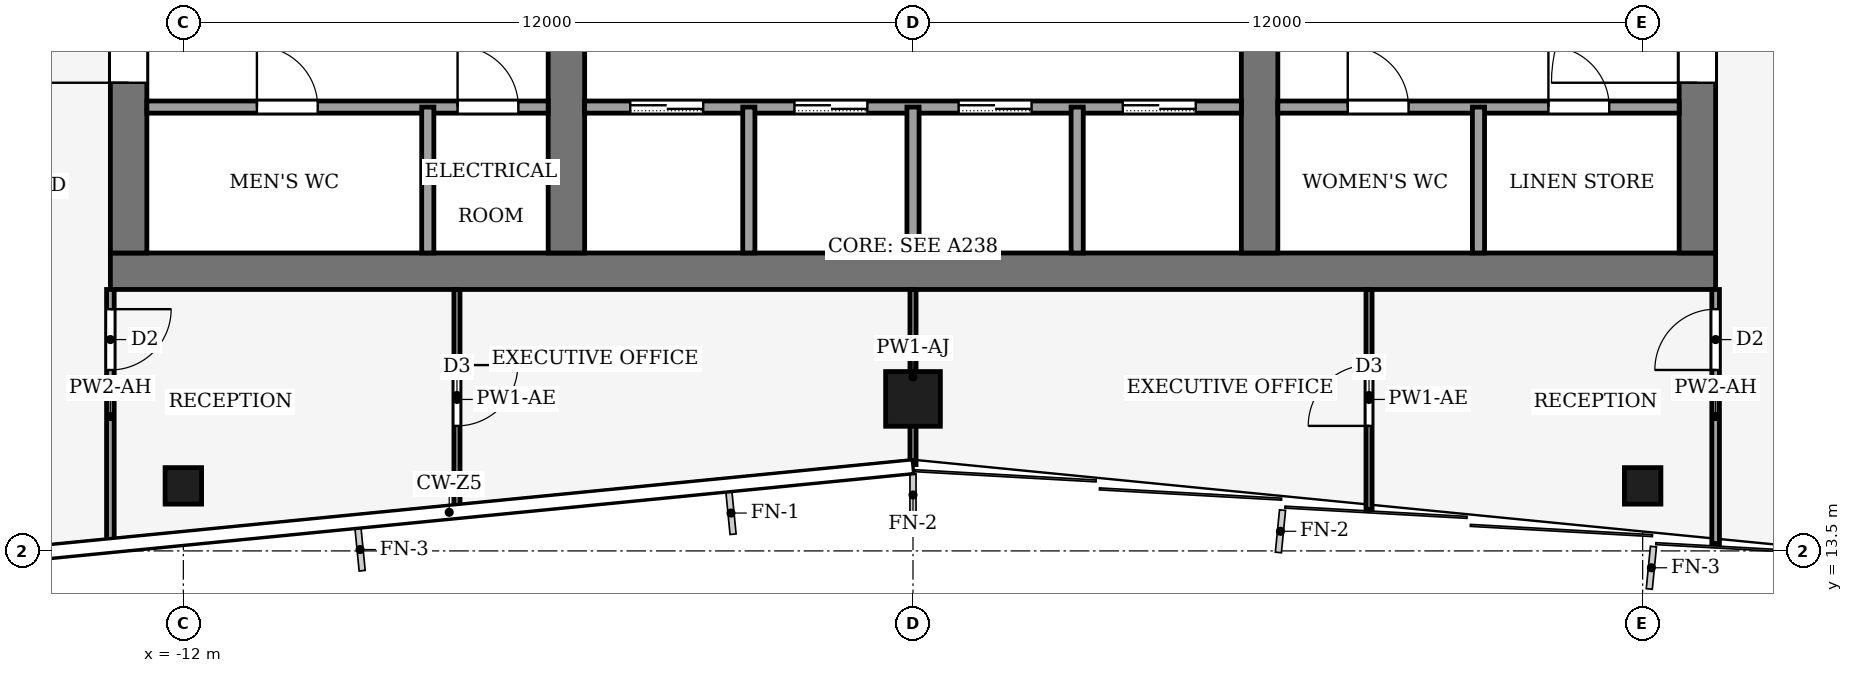
"""IFC4 building model, lengths in metres.
Left out: names, types, materials, properties, quantities, classifications, styles, units other than length and angle.
Written with IfcOpenShell. Run it as: python <this file> out.ifc"""

import sys

from ifc_helpers import new_model, si_unit, direction, frame, frame_2d, origin, origin_2d, place, context, subcontext, project, spatial, rectangle, hollow_rectangle, extrude, element, fill, save


model = new_model("IFC4")
c1 = context("Model", 3, precision=1e-05, world=origin(), true_north=direction((0.0, 1.0)))
c2 = subcontext(c1, "Body", "Model", "MODEL_VIEW")
j1 = project(units=[si_unit("LENGTHUNIT", "METRE"), si_unit("PLANEANGLEUNIT", "RADIAN")], contexts=[c1])
p1 = place(None, origin())
s1 = spatial("IfcSite", under=j1, at=p1, CompositionType="ELEMENT")
p2 = place(p1, origin())
s2 = spatial("IfcBuilding", under=s1, at=p2, CompositionType="ELEMENT")
p3 = place(p2, frame((0.0, 0.0, 330.0)))
s3 = spatial("IfcBuildingStorey", under=s2, at=p3, CompositionType="ELEMENT", Elevation=330.0)
p4 = place(p3, frame((-13.2, 18.1, -0.13), z_axis=(0.0, 0.0, 1.0), x_axis=(1.0, 0.0, 0.0)))
e1 = element("IfcWall", 1, at=p4, inside=s3, PredefinedType="SHEAR", context=c2, shape_type="SweptSolid", body=[
    extrude(rectangle(XDim=26.4, YDim=0.6, at=frame_2d((13.2, 0.0))), origin(), (0.0, 0.0, 1.0), 3.95),
])
p5 = place(p3, frame((-12.9, 18.4, -0.13), z_axis=(0.0, 0.0, 1.0), x_axis=(0.0, 1.0, 0.0)))
e2 = element("IfcWall", 2, at=p5, inside=s3, PredefinedType="SHEAR", context=c2, shape_type="SweptSolid", body=[
    extrude(rectangle(XDim=19.2, YDim=0.6, at=frame_2d((9.6, 0.0))), origin(), (0.0, 0.0, 1.0), 3.95),
])
p6 = place(p5, frame((2.8, 0.0, 0.13)))
e3 = element("IfcOpeningElement", 3, at=p6, cuts=e2, PredefinedType="OPENING", context=c2, shape_type="SweptSolid", body=[
    extrude(rectangle(XDim=2.4, YDim=2.4, at=frame_2d((1.2, 1.2))), frame((0.0, 0.31, 0.0), z_axis=(0.0, -1.0, 0.0), x_axis=(1.0, 0.0, 0.0)), (0.0, 0.0, 1.0), 0.62),
])
p7 = place(p5, frame((13.4, 0.0, 0.13)))
e4 = element("IfcOpeningElement", 4, at=p7, cuts=e2, PredefinedType="OPENING", context=c2, shape_type="SweptSolid", body=[
    extrude(rectangle(XDim=1.4, YDim=2.2, at=frame_2d((0.7, 1.1))), frame((0.0, 0.31, 0.0), z_axis=(0.0, -1.0, 0.0), x_axis=(1.0, 0.0, 0.0)), (0.0, 0.0, 1.0), 0.62),
])
p8 = place(p3, frame((12.9, 18.4, -0.13), z_axis=(0.0, 0.0, 1.0), x_axis=(0.0, 1.0, 0.0)))
e5 = element("IfcWall", 5, at=p8, inside=s3, PredefinedType="SHEAR", context=c2, shape_type="SweptSolid", body=[
    extrude(rectangle(XDim=19.2, YDim=0.6, at=frame_2d((9.6, 0.0))), origin(), (0.0, 0.0, 1.0), 3.95),
])
p9 = place(p8, frame((2.8, 0.0, 0.13)))
e6 = element("IfcOpeningElement", 6, at=p9, cuts=e5, PredefinedType="OPENING", context=c2, shape_type="SweptSolid", body=[
    extrude(rectangle(XDim=2.4, YDim=2.4, at=frame_2d((1.2, 1.2))), frame((0.0, 0.31, 0.0), z_axis=(0.0, -1.0, 0.0), x_axis=(1.0, 0.0, 0.0)), (0.0, 0.0, 1.0), 0.62),
])
p10 = place(p8, frame((13.3, 0.0, 0.13)))
e7 = element("IfcOpeningElement", 7, at=p10, cuts=e5, PredefinedType="OPENING", context=c2, shape_type="SweptSolid", body=[
    extrude(rectangle(XDim=2.4, YDim=2.4, at=frame_2d((1.2, 1.2))), frame((0.0, 0.31, 0.0), z_axis=(0.0, -1.0, 0.0), x_axis=(1.0, 0.0, 0.0)), (0.0, 0.0, 1.0), 0.62),
])
p11 = place(p3, frame((-5.7, 18.4, -0.13), z_axis=(0.0, 0.0, 1.0), x_axis=(0.0, 1.0, 0.0)))
e8 = element("IfcWall", 8, at=p11, inside=s3, PredefinedType="SHEAR", context=c2, shape_type="SweptSolid", body=[
    extrude(rectangle(XDim=19.2, YDim=0.6, at=frame_2d((9.6, 0.0))), origin(), (0.0, 0.0, 1.0), 3.95),
])
p12 = place(p11, frame((8.35, 0.0, 0.13)))
e9 = element("IfcOpeningElement", 9, at=p12, cuts=e8, PredefinedType="OPENING", context=c2, shape_type="SweptSolid", body=[
    extrude(rectangle(XDim=0.9, YDim=2.1, at=frame_2d((0.45, 1.05))), frame((0.0, 0.31, 0.0), z_axis=(0.0, -1.0, 0.0), x_axis=(1.0, 0.0, 0.0)), (0.0, 0.0, 1.0), 0.62),
])
p13 = place(p3, frame((5.7, 18.4, -0.13), z_axis=(0.0, 0.0, 1.0), x_axis=(0.0, 1.0, 0.0)))
e10 = element("IfcWall", 10, at=p13, inside=s3, PredefinedType="SHEAR", context=c2, shape_type="SweptSolid", body=[
    extrude(rectangle(XDim=19.2, YDim=0.6, at=frame_2d((9.6, 0.0))), origin(), (0.0, 0.0, 1.0), 3.95),
])
p14 = place(p13, frame((8.35, 0.0, 0.13)))
e11 = element("IfcOpeningElement", 11, at=p14, cuts=e10, PredefinedType="OPENING", context=c2, shape_type="SweptSolid", body=[
    extrude(rectangle(XDim=0.9, YDim=2.1, at=frame_2d((0.45, 1.05))), frame((0.0, 0.31, 0.0), z_axis=(0.0, -1.0, 0.0), x_axis=(1.0, 0.0, 0.0)), (0.0, 0.0, 1.0), 0.62),
])
p15 = place(p13, frame((13.3, 0.0, 0.13)))
e12 = element("IfcOpeningElement", 12, at=p15, cuts=e10, PredefinedType="OPENING", context=c2, shape_type="SweptSolid", body=[
    extrude(rectangle(XDim=2.4, YDim=2.4, at=frame_2d((1.2, 1.2))), frame((0.0, 0.31, 0.0), z_axis=(0.0, -1.0, 0.0), x_axis=(1.0, 0.0, 0.0)), (0.0, 0.0, 1.0), 0.62),
])
p16 = place(p3, frame((0.0, 16.0, 0.0), z_axis=(0.0, 0.0, 1.0), x_axis=(1.0, 0.0, 0.0)))
e13 = element("IfcColumn", 13, at=p16, inside=s3, PredefinedType="COLUMN", context=c2, shape_type="SweptSolid", body=[
    extrude(hollow_rectangle(XDim=0.9, YDim=0.9, WallThickness=0.04, at=origin_2d()), origin(), (0.0, 0.0, 1.0), 4.0),
])
for number, where, z_axis, x_axis in (
    (14, (-12.0, 14.57, 0.0), (0.0, 0.0, 1.0), (1.0, 0.0, 0.0)),
    (15, (12.0, 14.57, 0.0), (0.0, 0.0, 1.0), (1.0, 0.0, 0.0)),
):
    element("IfcColumn", number, at=place(p3, frame(where, z_axis=z_axis, x_axis=x_axis)), inside=s3, PredefinedType="COLUMN", context=c2, shape_type="SweptSolid", body=[
        extrude(hollow_rectangle(XDim=0.6, YDim=0.6, WallThickness=0.025, at=origin_2d()), origin(), (0.0, 0.0, 1.0), 4.0),
    ])
p17 = place(p3, frame((-12.6, 20.8, 0.0), z_axis=(0.0, 0.0, 1.0), x_axis=(1.0, 0.0, 0.0)))
e16 = element("IfcWall", 16, at=p17, inside=s3, PredefinedType="PARTITIONING", context=c2, shape_type="SweptSolid", body=[
    extrude(rectangle(XDim=6.6, YDim=0.2, at=frame_2d((3.3, 0.0))), origin(), (0.0, 0.0, 1.0), 3.82),
])
p18 = place(p17, frame((1.81, 0.0, 0.0)))
e17 = element("IfcOpeningElement", 17, at=p18, cuts=e16, PredefinedType="OPENING", context=c2, shape_type="SweptSolid", body=[
    extrude(rectangle(XDim=1.0, YDim=2.1, at=frame_2d((0.5, 1.05))), frame((0.0, 0.11, 0.0), z_axis=(0.0, -1.0, 0.0), x_axis=(1.0, 0.0, 0.0)), (0.0, 0.0, 1.0), 0.22),
])
p19 = place(p17, frame((5.11, 0.0, 0.0)))
e18 = element("IfcOpeningElement", 18, at=p19, cuts=e16, PredefinedType="OPENING", context=c2, shape_type="SweptSolid", body=[
    extrude(rectangle(XDim=1.0, YDim=2.1, at=frame_2d((0.5, 1.05))), frame((0.0, 0.11, 0.0), z_axis=(0.0, -1.0, 0.0), x_axis=(1.0, 0.0, 0.0)), (0.0, 0.0, 1.0), 0.22),
])
p20 = place(p3, frame((-5.4, 20.8, 0.0), z_axis=(0.0, 0.0, 1.0), x_axis=(1.0, 0.0, 0.0)))
e19 = element("IfcWall", 19, at=p20, inside=s3, PredefinedType="PARTITIONING", context=c2, shape_type="SweptSolid", body=[
    extrude(rectangle(XDim=10.8, YDim=0.2, at=frame_2d((5.4, 0.0))), origin(), (0.0, 0.0, 1.0), 3.82),
])
p21 = place(p20, frame((0.75, 0.0, 0.0)))
e20 = element("IfcOpeningElement", 20, at=p21, cuts=e19, PredefinedType="OPENING", context=c2, shape_type="SweptSolid", body=[
    extrude(rectangle(XDim=1.2, YDim=2.2, at=frame_2d((0.6, 1.1))), frame((0.0, 0.11, 0.0), z_axis=(0.0, -1.0, 0.0), x_axis=(1.0, 0.0, 0.0)), (0.0, 0.0, 1.0), 0.22),
])
p22 = place(p20, frame((3.45, 0.0, 0.0)))
e21 = element("IfcOpeningElement", 21, at=p22, cuts=e19, PredefinedType="OPENING", context=c2, shape_type="SweptSolid", body=[
    extrude(rectangle(XDim=1.2, YDim=2.2, at=frame_2d((0.6, 1.1))), frame((0.0, 0.11, 0.0), z_axis=(0.0, -1.0, 0.0), x_axis=(1.0, 0.0, 0.0)), (0.0, 0.0, 1.0), 0.22),
])
p23 = place(p20, frame((6.15, 0.0, 0.0)))
e22 = element("IfcOpeningElement", 22, at=p23, cuts=e19, PredefinedType="OPENING", context=c2, shape_type="SweptSolid", body=[
    extrude(rectangle(XDim=1.2, YDim=2.2, at=frame_2d((0.6, 1.1))), frame((0.0, 0.11, 0.0), z_axis=(0.0, -1.0, 0.0), x_axis=(1.0, 0.0, 0.0)), (0.0, 0.0, 1.0), 0.22),
])
p24 = place(p20, frame((8.85, 0.0, 0.0)))
e23 = element("IfcOpeningElement", 23, at=p24, cuts=e19, PredefinedType="OPENING", context=c2, shape_type="SweptSolid", body=[
    extrude(rectangle(XDim=1.2, YDim=2.2, at=frame_2d((0.6, 1.1))), frame((0.0, 0.11, 0.0), z_axis=(0.0, -1.0, 0.0), x_axis=(1.0, 0.0, 0.0)), (0.0, 0.0, 1.0), 0.22),
])
p25 = place(p3, frame((6.0, 20.8, 0.0), z_axis=(0.0, 0.0, 1.0), x_axis=(1.0, 0.0, 0.0)))
e24 = element("IfcWall", 24, at=p25, inside=s3, PredefinedType="PARTITIONING", context=c2, shape_type="SweptSolid", body=[
    extrude(rectangle(XDim=6.6, YDim=0.2, at=frame_2d((3.3, 0.0))), origin(), (0.0, 0.0, 1.0), 3.82),
])
p26 = place(p25, frame((1.15, 0.0, 0.0)))
e25 = element("IfcOpeningElement", 25, at=p26, cuts=e24, PredefinedType="OPENING", context=c2, shape_type="SweptSolid", body=[
    extrude(rectangle(XDim=1.0, YDim=2.1, at=frame_2d((0.5, 1.05))), frame((0.0, 0.11, 0.0), z_axis=(0.0, -1.0, 0.0), x_axis=(1.0, 0.0, 0.0)), (0.0, 0.0, 1.0), 0.22),
])
p27 = place(p25, frame((4.45, 0.0, 0.0)))
e26 = element("IfcOpeningElement", 26, at=p27, cuts=e24, PredefinedType="OPENING", context=c2, shape_type="SweptSolid", body=[
    extrude(rectangle(XDim=1.0, YDim=2.1, at=frame_2d((0.5, 1.05))), frame((0.0, 0.11, 0.0), z_axis=(0.0, -1.0, 0.0), x_axis=(1.0, 0.0, 0.0)), (0.0, 0.0, 1.0), 0.22),
])
for number, where, z_axis, x_axis in (
    (27, (-7.98, 18.4, 0.0), (0.0, 0.0, 1.0), (0.0, 1.0, 0.0)),
    (28, (-2.7, 18.4, 0.0), (0.0, 0.0, 1.0), (0.0, 1.0, 0.0)),
    (29, (0.0, 18.4, 0.0), (0.0, 0.0, 1.0), (0.0, 1.0, 0.0)),
    (30, (2.7, 18.4, 0.0), (0.0, 0.0, 1.0), (0.0, 1.0, 0.0)),
    (31, (9.3, 18.4, 0.0), (0.0, 0.0, 1.0), (0.0, 1.0, 0.0)),
):
    element("IfcWall", number, at=place(p3, frame(where, z_axis=z_axis, x_axis=x_axis)), inside=s3, PredefinedType="PARTITIONING", context=c2, shape_type="SweptSolid", body=[
        extrude(rectangle(XDim=2.4, YDim=0.2, at=frame_2d((1.2, 0.0))), origin(), (0.0, 0.0, 1.0), 3.82),
    ])
p28 = place(p3, frame((-13.2, 17.8, 0.0), z_axis=(0.0, 0.0, 1.0), x_axis=(0.0, -1.0, 0.0)))
e32 = element("IfcWall", 32, at=p28, inside=s3, PredefinedType="PARTITIONING", context=c2, shape_type="SweptSolid", body=[
    extrude(rectangle(XDim=4.178, YDim=0.125, at=frame_2d((2.089, 0.0))), origin(), (0.0, 0.0, 1.0), 2.99),
])
p29 = place(p28, frame((0.324, 0.0, 0.0)))
e33 = element("IfcOpeningElement", 33, at=p29, cuts=e32, PredefinedType="OPENING", context=c2, shape_type="SweptSolid", body=[
    extrude(rectangle(XDim=1.0, YDim=2.1, at=frame_2d((0.5, 1.05))), frame((0.0, 0.073, 0.0), z_axis=(0.0, -1.0, 0.0), x_axis=(1.0, 0.0, 0.0)), (0.0, 0.0, 1.0), 0.145),
])
p30 = place(p3, frame((13.2, 13.622, 0.0), z_axis=(0.0, 0.0, 1.0), x_axis=(0.0, 1.0, 0.0)))
e34 = element("IfcWall", 34, at=p30, inside=s3, PredefinedType="PARTITIONING", context=c2, shape_type="SweptSolid", body=[
    extrude(rectangle(XDim=4.178, YDim=0.125, at=frame_2d((2.089, 0.0))), origin(), (0.0, 0.0, 1.0), 2.99),
])
p31 = place(p30, frame((2.854, 0.0, 0.0)))
e35 = element("IfcOpeningElement", 35, at=p31, cuts=e34, PredefinedType="OPENING", context=c2, shape_type="SweptSolid", body=[
    extrude(rectangle(XDim=1.0, YDim=2.1, at=frame_2d((0.5, 1.05))), frame((0.0, 0.073, 0.0), z_axis=(0.0, -1.0, 0.0), x_axis=(1.0, 0.0, 0.0)), (0.0, 0.0, 1.0), 0.145),
])
p32 = place(p3, frame((-7.5, 17.8, 0.0), z_axis=(0.0, 0.0, 1.0), x_axis=(0.0, -1.0, 0.0)))
e36 = element("IfcWall", 36, at=p32, inside=s3, PredefinedType="PARTITIONING", context=c2, shape_type="SweptSolid", body=[
    extrude(rectangle(XDim=3.618, YDim=0.1, at=frame_2d((1.809, 0.0))), origin(), (0.0, 0.0, 1.0), 2.99),
])
p33 = place(p32, frame((1.244, 0.0, 0.0)))
e37 = element("IfcOpeningElement", 37, at=p33, cuts=e36, PredefinedType="OPENING", context=c2, shape_type="SweptSolid", body=[
    extrude(rectangle(XDim=1.0, YDim=2.1, at=frame_2d((0.5, 1.05))), frame((0.0, 0.06, 0.0), z_axis=(0.0, -1.0, 0.0), x_axis=(1.0, 0.0, 0.0)), (0.0, 0.0, 1.0), 0.12),
])
p34 = place(p3, frame((0.0, 14.92, 0.0), z_axis=(0.0, 0.0, 1.0), x_axis=(0.0, 1.0, 0.0)))
e38 = element("IfcWall", 38, at=p34, inside=s3, PredefinedType="PARTITIONING", context=c2, shape_type="SweptSolid", body=[
    extrude(rectangle(XDim=2.88, YDim=0.1, at=frame_2d((1.44, 0.0))), origin(), (0.0, 0.0, 1.0), 3.49),
])
p35 = place(p3, frame((7.5, 14.182, 0.0), z_axis=(0.0, 0.0, 1.0), x_axis=(0.0, 1.0, 0.0)))
e39 = element("IfcWall", 39, at=p35, inside=s3, PredefinedType="PARTITIONING", context=c2, shape_type="SweptSolid", body=[
    extrude(rectangle(XDim=3.618, YDim=0.1, at=frame_2d((1.809, 0.0))), origin(), (0.0, 0.0, 1.0), 2.99),
])
p36 = place(p35, frame((1.374, 0.0, 0.0)))
e40 = element("IfcOpeningElement", 40, at=p36, cuts=e39, PredefinedType="OPENING", context=c2, shape_type="SweptSolid", body=[
    extrude(rectangle(XDim=1.0, YDim=2.1, at=frame_2d((0.5, 1.05))), frame((0.0, 0.06, 0.0), z_axis=(0.0, -1.0, 0.0), x_axis=(1.0, 0.0, 0.0)), (0.0, 0.0, 1.0), 0.12),
])
p37 = place(p21, origin())
e41 = element("IfcDoor", 41, at=p37, inside=s3, OperationType="SLIDING_TO_LEFT", PredefinedType="DOOR", context=c2, shape_type="SweptSolid", body=[
    extrude(rectangle(XDim=1.2, YDim=2.2, at=frame_2d((0.6, 1.1))), frame((0.0, 0.025, 0.0), z_axis=(0.0, -1.0, 0.0), x_axis=(1.0, 0.0, 0.0)), (0.0, 0.0, 1.0), 0.05),
])
fill(e20, e41)
p38 = place(p22, origin())
e42 = element("IfcDoor", 42, at=p38, inside=s3, OperationType="SLIDING_TO_LEFT", PredefinedType="DOOR", context=c2, shape_type="SweptSolid", body=[
    extrude(rectangle(XDim=1.2, YDim=2.2, at=frame_2d((0.6, 1.1))), frame((0.0, 0.025, 0.0), z_axis=(0.0, -1.0, 0.0), x_axis=(1.0, 0.0, 0.0)), (0.0, 0.0, 1.0), 0.05),
])
fill(e21, e42)
p39 = place(p23, origin())
e43 = element("IfcDoor", 43, at=p39, inside=s3, OperationType="SLIDING_TO_LEFT", PredefinedType="DOOR", context=c2, shape_type="SweptSolid", body=[
    extrude(rectangle(XDim=1.2, YDim=2.2, at=frame_2d((0.6, 1.1))), frame((0.0, 0.025, 0.0), z_axis=(0.0, -1.0, 0.0), x_axis=(1.0, 0.0, 0.0)), (0.0, 0.0, 1.0), 0.05),
])
fill(e22, e43)
p40 = place(p24, origin())
e44 = element("IfcDoor", 44, at=p40, inside=s3, OperationType="SLIDING_TO_LEFT", PredefinedType="DOOR", context=c2, shape_type="SweptSolid", body=[
    extrude(rectangle(XDim=1.2, YDim=2.2, at=frame_2d((0.6, 1.1))), frame((0.0, 0.025, 0.0), z_axis=(0.0, -1.0, 0.0), x_axis=(1.0, 0.0, 0.0)), (0.0, 0.0, 1.0), 0.05),
])
fill(e23, e44)
p41 = place(p18, origin())
e45 = element("IfcDoor", 45, at=p41, inside=s3, OperationType="SINGLE_SWING_LEFT", PredefinedType="DOOR", context=c2, shape_type="SweptSolid", body=[
    extrude(rectangle(XDim=1.0, YDim=2.1, at=frame_2d((0.5, 1.05))), frame((0.0, 0.025, 0.0), z_axis=(0.0, -1.0, 0.0), x_axis=(1.0, 0.0, 0.0)), (0.0, 0.0, 1.0), 0.05),
])
fill(e17, e45)
p42 = place(p19, origin())
e46 = element("IfcDoor", 46, at=p42, inside=s3, OperationType="SINGLE_SWING_LEFT", PredefinedType="DOOR", context=c2, shape_type="SweptSolid", body=[
    extrude(rectangle(XDim=1.0, YDim=2.1, at=frame_2d((0.5, 1.05))), frame((0.0, 0.025, 0.0), z_axis=(0.0, -1.0, 0.0), x_axis=(1.0, 0.0, 0.0)), (0.0, 0.0, 1.0), 0.05),
])
fill(e18, e46)
p43 = place(p26, origin())
e47 = element("IfcDoor", 47, at=p43, inside=s3, OperationType="SINGLE_SWING_LEFT", PredefinedType="DOOR", context=c2, shape_type="SweptSolid", body=[
    extrude(rectangle(XDim=1.0, YDim=2.1, at=frame_2d((0.5, 1.05))), frame((0.0, 0.025, 0.0), z_axis=(0.0, -1.0, 0.0), x_axis=(1.0, 0.0, 0.0)), (0.0, 0.0, 1.0), 0.05),
])
fill(e25, e47)
p44 = place(p27, origin())
e48 = element("IfcDoor", 48, at=p44, inside=s3, OperationType="SINGLE_SWING_LEFT", PredefinedType="DOOR", context=c2, shape_type="SweptSolid", body=[
    extrude(rectangle(XDim=1.0, YDim=2.1, at=frame_2d((0.5, 1.05))), frame((0.0, 0.025, 0.0), z_axis=(0.0, -1.0, 0.0), x_axis=(1.0, 0.0, 0.0)), (0.0, 0.0, 1.0), 0.05),
])
fill(e26, e48)
p45 = place(p6, origin())
e49 = element("IfcDoor", 49, at=p45, inside=s3, OperationType="DOUBLE_DOOR_SINGLE_SWING", PredefinedType="DOOR", context=c2, shape_type="SweptSolid", body=[
    extrude(rectangle(XDim=2.4, YDim=2.4, at=frame_2d((1.2, 1.2))), frame((0.0, 0.025, 0.0), z_axis=(0.0, -1.0, 0.0), x_axis=(1.0, 0.0, 0.0)), (0.0, 0.0, 1.0), 0.05),
])
fill(e3, e49)
p46 = place(p9, origin())
e50 = element("IfcDoor", 50, at=p46, inside=s3, OperationType="DOUBLE_DOOR_SINGLE_SWING", PredefinedType="DOOR", context=c2, shape_type="SweptSolid", body=[
    extrude(rectangle(XDim=2.4, YDim=2.4, at=frame_2d((1.2, 1.2))), frame((0.0, 0.025, 0.0), z_axis=(0.0, -1.0, 0.0), x_axis=(1.0, 0.0, 0.0)), (0.0, 0.0, 1.0), 0.05),
])
fill(e6, e50)
p47 = place(p29, origin())
e51 = element("IfcDoor", 51, at=p47, inside=s3, OperationType="SINGLE_SWING_LEFT", PredefinedType="DOOR", context=c2, shape_type="SweptSolid", body=[
    extrude(rectangle(XDim=1.0, YDim=2.1, at=frame_2d((0.5, 1.05))), frame((0.0, 0.025, 0.0), z_axis=(0.0, -1.0, 0.0), x_axis=(1.0, 0.0, 0.0)), (0.0, 0.0, 1.0), 0.05),
])
fill(e33, e51)
p48 = place(p31, origin())
e52 = element("IfcDoor", 52, at=p48, inside=s3, OperationType="SINGLE_SWING_RIGHT", PredefinedType="DOOR", context=c2, shape_type="SweptSolid", body=[
    extrude(rectangle(XDim=1.0, YDim=2.1, at=frame_2d((0.5, 1.05))), frame((0.0, 0.025, 0.0), z_axis=(0.0, -1.0, 0.0), x_axis=(1.0, 0.0, 0.0)), (0.0, 0.0, 1.0), 0.05),
])
fill(e35, e52)
p49 = place(p33, origin())
e53 = element("IfcDoor", 53, at=p49, inside=s3, OperationType="SINGLE_SWING_LEFT", PredefinedType="DOOR", context=c2, shape_type="SweptSolid", body=[
    extrude(rectangle(XDim=1.0, YDim=2.1, at=frame_2d((0.5, 1.05))), frame((0.0, 0.025, 0.0), z_axis=(0.0, -1.0, 0.0), x_axis=(1.0, 0.0, 0.0)), (0.0, 0.0, 1.0), 0.05),
])
fill(e37, e53)
p50 = place(p36, origin())
e54 = element("IfcDoor", 54, at=p50, inside=s3, OperationType="SINGLE_SWING_RIGHT", PredefinedType="DOOR", context=c2, shape_type="SweptSolid", body=[
    extrude(rectangle(XDim=1.0, YDim=2.1, at=frame_2d((0.5, 1.05))), frame((0.0, 0.025, 0.0), z_axis=(0.0, -1.0, 0.0), x_axis=(1.0, 0.0, 0.0)), (0.0, 0.0, 1.0), 0.05),
])
fill(e40, e54)
save(model, sys.argv[1])
